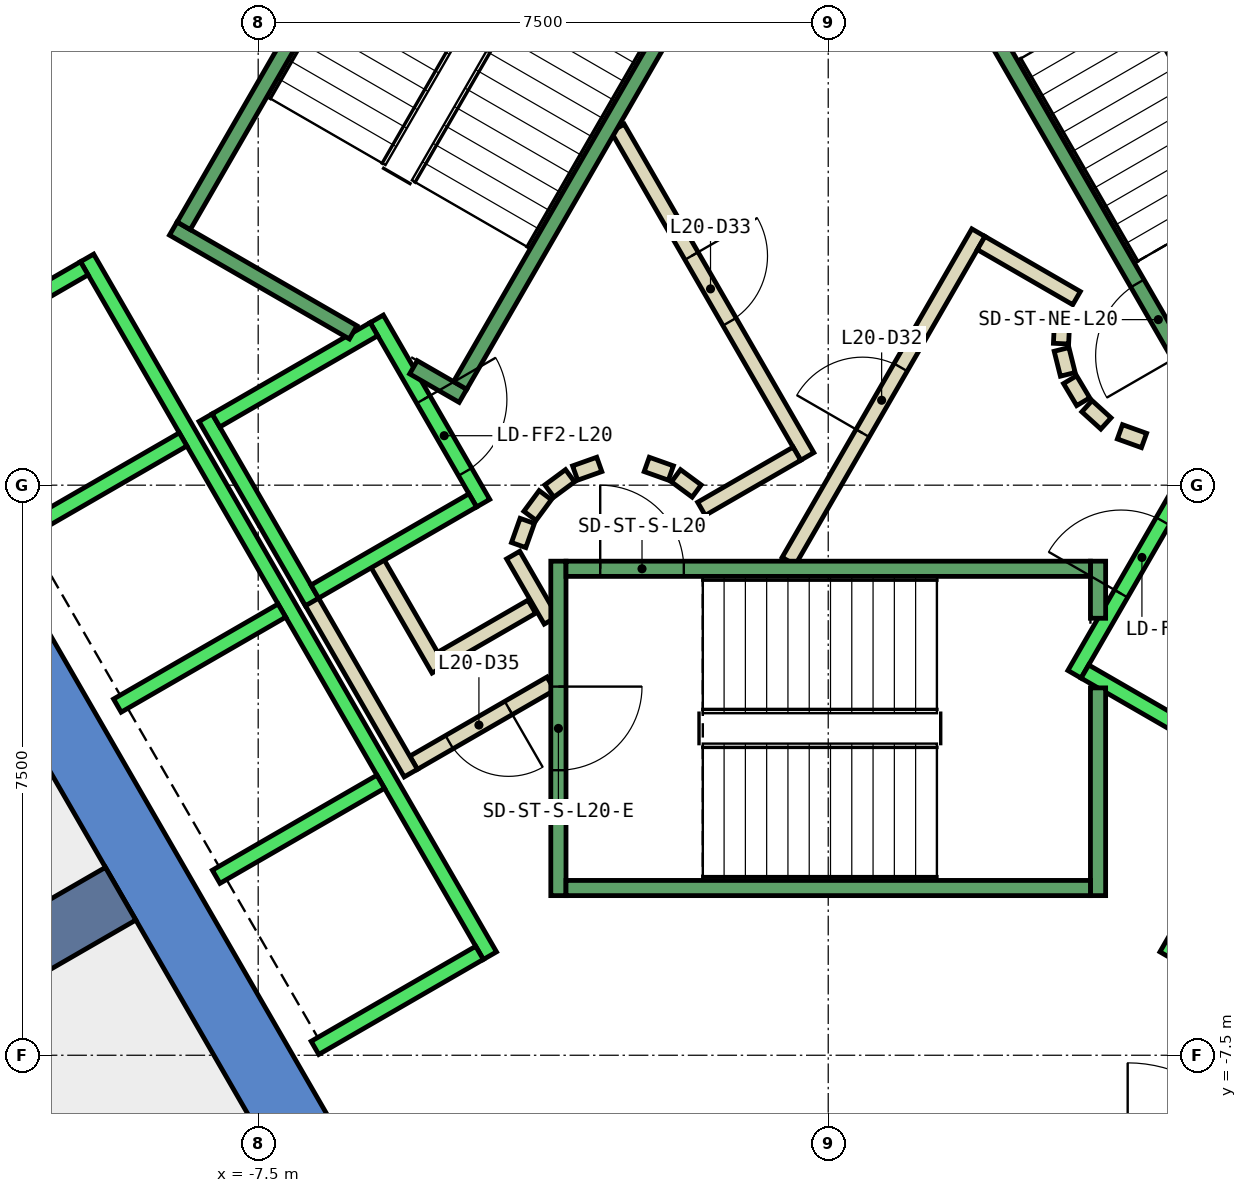
"""IFC4 building model, lengths in metres.
Left out: names, types, materials, properties, quantities, classifications, styles, units other than length and angle.
Written with IfcOpenShell. Run it as: python <this file> out.ifc"""

import sys

from ifc_helpers import new_model, si_unit, direction, frame, frame_2d, origin, place, context, subcontext, project, spatial, polyline, rectangle, outline, extrude, element, fill, save


model = new_model("IFC4")
c1 = context("Model", 3, precision=1e-05, world=origin(), true_north=direction((0.0, 1.0)))
c2 = subcontext(c1, "Body", "Model", "MODEL_VIEW")
j1 = project(units=[si_unit("LENGTHUNIT", "METRE"), si_unit("PLANEANGLEUNIT", "RADIAN")], contexts=[c1])
p1 = place(None, origin())
s1 = spatial("IfcSite", under=j1, at=p1, CompositionType="ELEMENT")
p2 = place(p1, origin())
s2 = spatial("IfcBuilding", under=s1, at=p2, CompositionType="ELEMENT")
p3 = place(p2, frame((0.0, 0.0, 95.0)))
s3 = spatial("IfcBuildingStorey", under=s2, at=p3, CompositionType="ELEMENT", Elevation=95.0)
p4 = place(p3, frame((0.0, 0.0, -0.4)))
e1 = element("IfcWall", 1, at=p4, inside=s3, PredefinedType="SHEAR", context=c2, shape_type="SweptSolid", body=[
    extrude(outline(polyline([(-12.267, 5.252), (-11.488, 4.802), (-6.409, 13.6), (-6.928, 14.5), (-12.267, 5.252)])), origin(), (0.0, 0.0, 1.0), 4.2),
])
p5 = place(p3, frame((0.0, 0.0, -0.4)))
e2 = element("IfcWall", 2, at=p5, inside=s3, PredefinedType="SHEAR", context=c2, shape_type="SweptSolid", body=[
    extrude(outline(polyline([(-13.856, 2.5), (-6.928, -9.5), (-6.409, -8.6), (-12.817, 2.5), (-13.856, 2.5)])), origin(), (0.0, 0.0, 1.0), 4.2),
])
p6 = place(p3, frame((-9.31, -5.375, -0.4), z_axis=(0.0, 0.0, 1.0), x_axis=(-0.866017533419, -0.500013631625, 0.0)))
e3 = element("IfcWall", 3, at=p6, inside=s3, PredefinedType="SHEAR", context=c2, shape_type="SweptSolid", body=[
    extrude(rectangle(XDim=9.0, YDim=0.8, at=frame_2d((4.5, 0.0))), origin(), (0.0, 0.0, 1.0), 4.2),
])
p7 = place(p3, frame((-3.9, -1.599, 0.0), z_axis=(0.0, 0.0, 1.0), x_axis=(-0.865969445389, -0.500096910261, 0.0)))
e4 = element("IfcWall", 4, at=p7, inside=s3, PredefinedType="PARTITIONING", context=c2, shape_type="SweptSolid", body=[
    extrude(rectangle(XDim=1.373, YDim=0.2, at=frame_2d((0.687, 0.0))), origin(), (0.0, 0.0, 1.0), 3.8),
])
p8 = place(p3, frame((-5.126, -2.422, 0.0), z_axis=(0.0, 0.0, 1.0), x_axis=(-0.500062241894, 0.865989465428, 0.0)))
e5 = element("IfcWall", 5, at=p8, inside=s3, PredefinedType="PARTITIONING", context=c2, shape_type="SweptSolid", body=[
    extrude(rectangle(XDim=1.7, YDim=0.2, at=frame_2d((0.85, 0.0))), origin(), (0.0, 0.0, 1.0), 3.8),
])
p9 = place(p3, frame((-3.65, -2.61, 0.0), z_axis=(0.0, 0.0, 1.0), x_axis=(-0.866072462134, -0.499918483688, 0.0)))
e6 = element("IfcWall", 6, at=p9, inside=s3, PredefinedType="PARTITIONING", context=c2, shape_type="SweptSolid", body=[
    extrude(rectangle(XDim=2.084, YDim=0.2, at=frame_2d((1.042, 0.0))), origin(), (0.0, 0.0, 1.0), 3.8),
])
p10 = place(p9, frame((0.642, 0.0, 0.0)))
e7 = element("IfcOpeningElement", 7, at=p10, cuts=e6, PredefinedType="OPENING", context=c2, shape_type="SweptSolid", body=[
    extrude(rectangle(XDim=0.9, YDim=2.1, at=frame_2d((0.45, 1.05))), frame((0.0, 0.11, 0.0), z_axis=(0.0, -1.0, 0.0), x_axis=(1.0, 0.0, 0.0)), (0.0, 0.0, 1.0), 0.22),
])
p11 = place(p3, frame((-5.492, -3.788, 0.0), z_axis=(0.0, 0.0, 1.0), x_axis=(-0.500008949224, 0.866020236886, 0.0)))
e8 = element("IfcWall", 8, at=p11, inside=s3, PredefinedType="PARTITIONING", context=c2, shape_type="SweptSolid", body=[
    extrude(rectangle(XDim=2.68, YDim=0.2, at=frame_2d((1.34, 0.0))), origin(), (0.0, 0.0, 1.0), 3.8),
])
p12 = place(p3, frame((-4.145, -0.92, 0.0), z_axis=(0.0, 0.0, 1.0), x_axis=(0.499743786207, -0.866173278362, 0.0)))
e9 = element("IfcWall", 9, at=p12, inside=s3, PredefinedType="PARTITIONING", context=c2, shape_type="SweptSolid", body=[
    extrude(rectangle(XDim=0.991, YDim=0.2, at=frame_2d((0.495, 0.0))), origin(), (0.0, 0.0, 1.0), 3.8),
])
p13 = place(p3, frame((-0.52, -1.0, 0.0), z_axis=(0.0, 0.0, 1.0), x_axis=(0.50011622646, 0.865958290007, 0.0)))
e10 = element("IfcWall", 10, at=p13, inside=s3, PredefinedType="PARTITIONING", context=c2, shape_type="SweptSolid", body=[
    extrude(rectangle(XDim=4.991, YDim=0.2, at=frame_2d((2.496, 0.0))), origin(), (0.0, 0.0, 1.0), 3.8),
])
p14 = place(p13, frame((1.945, 0.0, 0.0)))
e11 = element("IfcOpeningElement", 11, at=p14, cuts=e10, PredefinedType="OPENING", context=c2, shape_type="SweptSolid", body=[
    extrude(rectangle(XDim=1.0, YDim=2.1, at=frame_2d((0.5, 1.05))), frame((0.0, 0.11, 0.0), z_axis=(0.0, -1.0, 0.0), x_axis=(1.0, 0.0, 0.0)), (0.0, 0.0, 1.0), 0.22),
])
p15 = place(p3, frame((2.012, 3.186, 0.0), z_axis=(0.0, 0.0, 1.0), x_axis=(0.865891012941, -0.500232699559, 0.0)))
e12 = element("IfcWall", 12, at=p15, inside=s3, PredefinedType="PARTITIONING", context=c2, shape_type="SweptSolid", body=[
    extrude(rectangle(XDim=1.449, YDim=0.2, at=frame_2d((0.725, 0.0))), origin(), (0.0, 0.0, 1.0), 3.8),
])
p16 = place(p3, frame((3.079, 2.199, 0.0), z_axis=(0.0, 0.0, 1.0), x_axis=(-0.047771483479, -0.998858290933, 0.0)))
e13 = element("IfcWall", 13, at=p16, inside=s3, PredefinedType="PARTITIONING", context=c2, shape_type="SweptSolid", body=[
    extrude(rectangle(XDim=0.337, YDim=0.2, at=frame_2d((0.169, 0.0))), origin(), (0.0, 0.0, 1.0), 3.8),
])
p17 = place(p3, frame((3.07, 1.786, 0.0), z_axis=(0.0, 0.0, 1.0), x_axis=(0.242705583207, -0.970099994784, 0.0)))
e14 = element("IfcWall", 14, at=p17, inside=s3, PredefinedType="PARTITIONING", context=c2, shape_type="SweptSolid", body=[
    extrude(rectangle(XDim=0.338, YDim=0.2, at=frame_2d((0.169, 0.0))), origin(), (0.0, 0.0, 1.0), 3.8),
])
for number, where, z_axis, x_axis in (
    (15, (3.182, 1.388, 0.0), (0.0, 0.0, 1.0), (0.512, -0.859, 0.0)),
    (16, (3.404, 1.039, 0.0), (0.0, 0.0, 1.0), (0.74, -0.672, 0.0)),
):
    element("IfcWall", number, at=place(p3, frame(where, z_axis=z_axis, x_axis=x_axis)), inside=s3, PredefinedType="PARTITIONING", context=c2, shape_type="SweptSolid", body=[
        extrude(rectangle(XDim=0.338, YDim=0.2, at=frame_2d((0.169, 0.0))), origin(), (0.0, 0.0, 1.0), 3.8),
    ])
p18 = place(p3, frame((3.838, 0.702, 0.0), z_axis=(0.0, 0.0, 1.0), x_axis=(0.941035081519, -0.338308993895, 0.0)))
e17 = element("IfcWall", 17, at=p18, inside=s3, PredefinedType="PARTITIONING", context=c2, shape_type="SweptSolid", body=[
    extrude(rectangle(XDim=0.337, YDim=0.2, at=frame_2d((0.168, 0.0))), origin(), (0.0, 0.0, 1.0), 3.8),
])
p19 = place(p3, frame((-2.771, 4.7, 0.0), z_axis=(0.0, 0.0, 1.0), x_axis=(0.499969479948, -0.866043023828, 0.0)))
e18 = element("IfcWall", 18, at=p19, inside=s3, PredefinedType="PARTITIONING", context=c2, shape_type="SweptSolid", body=[
    extrude(rectangle(XDim=4.99, YDim=0.2, at=frame_2d((2.495, 0.0))), origin(), (0.0, 0.0, 1.0), 3.8),
])
p20 = place(p19, frame((1.945, 0.0, 0.0)))
e19 = element("IfcOpeningElement", 19, at=p20, cuts=e18, PredefinedType="OPENING", context=c2, shape_type="SweptSolid", body=[
    extrude(rectangle(XDim=1.0, YDim=2.1, at=frame_2d((0.5, 1.05))), frame((0.0, 0.11, 0.0), z_axis=(0.0, -1.0, 0.0), x_axis=(1.0, 0.0, 0.0)), (0.0, 0.0, 1.0), 0.22),
])
p21 = place(p3, frame((-0.412, 0.414, 0.0), z_axis=(0.0, 0.0, 1.0), x_axis=(-0.866017369001, -0.500013916395, 0.0)))
e20 = element("IfcWall", 20, at=p21, inside=s3, PredefinedType="PARTITIONING", context=c2, shape_type="SweptSolid", body=[
    extrude(rectangle(XDim=1.45, YDim=0.2, at=frame_2d((0.725, 0.0))), origin(), (0.0, 0.0, 1.0), 3.8),
])
p22 = place(p3, frame((-1.731, -0.077, 0.0), z_axis=(0.0, 0.0, 1.0), x_axis=(-0.804311165252, 0.594208338422, 0.0)))
e21 = element("IfcWall", 21, at=p22, inside=s3, PredefinedType="PARTITIONING", context=c2, shape_type="SweptSolid", body=[
    extrude(rectangle(XDim=0.338, YDim=0.2, at=frame_2d((0.169, 0.0))), origin(), (0.0, 0.0, 1.0), 3.8),
])
p23 = place(p3, frame((-2.07, 0.16, 0.0), z_axis=(0.0, 0.0, 1.0), x_axis=(-0.942199461132, 0.335052496547, 0.0)))
e22 = element("IfcWall", 22, at=p23, inside=s3, PredefinedType="PARTITIONING", context=c2, shape_type="SweptSolid", body=[
    extrude(rectangle(XDim=0.337, YDim=0.2, at=frame_2d((0.169, 0.0))), origin(), (0.0, 0.0, 1.0), 3.8),
])
p24 = place(p3, frame((-3.012, 0.273, 0.0), z_axis=(0.0, 0.0, 1.0), x_axis=(-0.942280615813, -0.334824194261, 0.0)))
e23 = element("IfcWall", 23, at=p24, inside=s3, PredefinedType="PARTITIONING", context=c2, shape_type="SweptSolid", body=[
    extrude(rectangle(XDim=0.338, YDim=0.2, at=frame_2d((0.169, 0.0))), origin(), (0.0, 0.0, 1.0), 3.8),
])
p25 = place(p3, frame((-3.397, 0.124, 0.0), z_axis=(0.0, 0.0, 1.0), x_axis=(-0.804311165252, -0.594208338422, 0.0)))
e24 = element("IfcWall", 24, at=p25, inside=s3, PredefinedType="PARTITIONING", context=c2, shape_type="SweptSolid", body=[
    extrude(rectangle(XDim=0.338, YDim=0.2, at=frame_2d((0.169, 0.0))), origin(), (0.0, 0.0, 1.0), 3.8),
])
p26 = place(p3, frame((-3.723, -0.131, 0.0), z_axis=(0.0, 0.0, 1.0), x_axis=(-0.594675113454, -0.803966112121, 0.0)))
e25 = element("IfcWall", 25, at=p26, inside=s3, PredefinedType="PARTITIONING", context=c2, shape_type="SweptSolid", body=[
    extrude(rectangle(XDim=0.338, YDim=0.2, at=frame_2d((0.169, 0.0))), origin(), (0.0, 0.0, 1.0), 3.8),
])
p27 = place(p3, frame((-3.96, -0.47, 0.0), z_axis=(0.0, 0.0, 1.0), x_axis=(-0.334824194261, -0.942280615813, 0.0)))
e26 = element("IfcWall", 26, at=p27, inside=s3, PredefinedType="PARTITIONING", context=c2, shape_type="SweptSolid", body=[
    extrude(rectangle(XDim=0.338, YDim=0.2, at=frame_2d((0.169, 0.0))), origin(), (0.0, 0.0, 1.0), 3.8),
])
p28 = place(p3, frame((-5.94, 2.188, 0.0), z_axis=(0.0, 0.0, 1.0), x_axis=(0.49994636267, -0.866056369097, 0.0)))
e27 = element("IfcWall", 27, at=p28, inside=s3, PredefinedType="STANDARD", context=c2, shape_type="SweptSolid", body=[
    extrude(rectangle(XDim=2.8, YDim=0.2, at=frame_2d((1.4, 0.0))), origin(), (0.0, 0.0, 1.0), 3.8),
])
p29 = place(p28, frame((1.225, 0.0, 0.0)))
e28 = element("IfcOpeningElement", 28, at=p29, cuts=e27, PredefinedType="OPENING", context=c2, shape_type="SweptSolid", body=[
    extrude(rectangle(XDim=1.1, YDim=2.1, at=frame_2d((0.55, 1.05))), frame((0.0, 0.11, 0.0), z_axis=(0.0, -1.0, 0.0), x_axis=(1.0, 0.0, 0.0)), (0.0, 0.0, 1.0), 0.22),
])
p30 = place(p3, frame((-8.192, 0.888, 0.0), z_axis=(0.0, 0.0, 1.0), x_axis=(0.49994636267, -0.866056369097, 0.0)))
e29 = element("IfcWall", 29, at=p30, inside=s3, PredefinedType="STANDARD", context=c2, shape_type="SweptSolid", body=[
    extrude(rectangle(XDim=2.8, YDim=0.2, at=frame_2d((1.4, 0.0))), origin(), (0.0, 0.0, 1.0), 3.8),
])
for number, where, z_axis, x_axis in (
    (30, (-5.977, 2.052, 0.0), (0.0, 0.0, 1.0), (-0.866, -0.5, 0.0)),
    (31, (-4.677, -0.2, 0.0), (0.0, 0.0, 1.0), (-0.866, -0.5, 0.0)),
):
    element("IfcWall", number, at=place(p3, frame(where, z_axis=z_axis, x_axis=x_axis)), inside=s3, PredefinedType="STANDARD", context=c2, shape_type="SweptSolid", body=[
        extrude(rectangle(XDim=2.399, YDim=0.2, at=frame_2d((1.2, 0.0))), origin(), (0.0, 0.0, 1.0), 3.8),
    ])
p31 = place(p3, frame((-9.751, 2.99, 0.0), z_axis=(0.0, 0.0, 1.0), x_axis=(0.50000090737, -0.866024879913, 0.0)))
e32 = element("IfcWall", 32, at=p31, inside=s3, PredefinedType="STANDARD", context=c2, shape_type="SweptSolid", body=[
    extrude(rectangle(XDim=10.6, YDim=0.2, at=frame_2d((5.3, 0.0))), origin(), (0.0, 0.0, 1.0), 3.8),
])
p32 = place(p3, frame((-9.788, 2.853, 0.0), z_axis=(0.0, 0.0, 1.0), x_axis=(-0.865998541277, -0.500046524342, 0.0)))
e33 = element("IfcWall", 33, at=p32, inside=s3, PredefinedType="STANDARD", context=c2, shape_type="SweptSolid", body=[
    extrude(rectangle(XDim=2.5, YDim=0.2, at=frame_2d((1.25, 0.0))), origin(), (0.0, 0.0, 1.0), 3.8),
])
for number, where, z_axis, x_axis in (
    (34, (-8.488, 0.602, 0.0), (0.0, 0.0, 1.0), (-0.866, -0.5, 0.0)),
    (35, (-7.188, -1.65, 0.0), (0.0, 0.0, 1.0), (-0.866, -0.5, 0.0)),
    (36, (-5.888, -3.902, 0.0), (0.0, 0.0, 1.0), (-0.866, -0.5, 0.0)),
    (37, (-4.588, -6.153, 0.0), (0.0, 0.0, 1.0), (-0.866, -0.5, 0.0)),
):
    element("IfcWall", number, at=place(p3, frame(where, z_axis=z_axis, x_axis=x_axis)), inside=s3, PredefinedType="STANDARD", context=c2, shape_type="SweptSolid", body=[
        extrude(rectangle(XDim=2.5, YDim=0.2, at=frame_2d((1.25, 0.0))), origin(), (0.0, 0.0, 1.0), 3.8),
    ])
p33 = place(p3, frame((3.24, -2.488, 0.0), z_axis=(0.0, 0.0, 1.0), x_axis=(0.49994636267, 0.866056369097, 0.0)))
e38 = element("IfcWall", 38, at=p33, inside=s3, PredefinedType="STANDARD", context=c2, shape_type="SweptSolid", body=[
    extrude(rectangle(XDim=2.8, YDim=0.2, at=frame_2d((1.4, 0.0))), origin(), (0.0, 0.0, 1.0), 3.8),
])
p34 = place(p33, frame((1.225, 0.0, 0.0)))
e39 = element("IfcOpeningElement", 39, at=p34, cuts=e38, PredefinedType="OPENING", context=c2, shape_type="SweptSolid", body=[
    extrude(rectangle(XDim=1.1, YDim=2.1, at=frame_2d((0.55, 1.05))), frame((0.0, 0.11, 0.0), z_axis=(0.0, -1.0, 0.0), x_axis=(1.0, 0.0, 0.0)), (0.0, 0.0, 1.0), 0.22),
])
p35 = place(p3, frame((3.377, -2.452, 0.0), z_axis=(0.0, 0.0, 1.0), x_axis=(0.865955154139, -0.50012165622, 0.0)))
e40 = element("IfcWall", 40, at=p35, inside=s3, PredefinedType="STANDARD", context=c2, shape_type="SweptSolid", body=[
    extrude(rectangle(XDim=2.4, YDim=0.2, at=frame_2d((1.2, 0.0))), origin(), (0.0, 0.0, 1.0), 3.8),
])
p36 = place(p3, frame((4.451, -6.19, 0.0), z_axis=(0.0, 0.0, 1.0), x_axis=(0.50000090737, 0.866024879913, 0.0)))
e41 = element("IfcWall", 41, at=p36, inside=s3, PredefinedType="STANDARD", context=c2, shape_type="SweptSolid", body=[
    extrude(rectangle(XDim=10.6, YDim=0.2, at=frame_2d((5.3, 0.0))), origin(), (0.0, 0.0, 1.0), 3.8),
])
p37 = place(p3, frame((-3.55, -1.0, 0.0), z_axis=(0.0, 0.0, 1.0), x_axis=(0.0, -1.0, 0.0)))
e42 = element("IfcWall", 42, at=p37, inside=s3, PredefinedType="STANDARD", context=c2, shape_type="SweptSolid", body=[
    extrude(rectangle(XDim=4.4, YDim=0.2, at=frame_2d((2.2, 0.0))), origin(), (0.0, 0.0, 1.0), 3.8),
])
p38 = place(p37, frame((1.65, 0.0, 0.0)))
e43 = element("IfcOpeningElement", 43, at=p38, cuts=e42, PredefinedType="OPENING", context=c2, shape_type="SweptSolid", body=[
    extrude(rectangle(XDim=1.1, YDim=2.2, at=frame_2d((0.55, 1.1))), frame((0.0, 0.11, 0.0), z_axis=(0.0, -1.0, 0.0), x_axis=(1.0, 0.0, 0.0)), (0.0, 0.0, 1.0), 0.22),
])
p39 = place(p3, frame((3.55, -2.667, 0.0), z_axis=(0.0, 0.0, 1.0), x_axis=(0.0, -1.0, 0.0)))
e44 = element("IfcWall", 44, at=p39, inside=s3, PredefinedType="STANDARD", context=c2, shape_type="SweptSolid", body=[
    extrude(rectangle(XDim=2.733, YDim=0.2, at=frame_2d((1.366, 0.0))), origin(), (0.0, 0.0, 1.0), 3.8),
])
p40 = place(p3, frame((3.55, -1.0, 0.0), z_axis=(0.0, 0.0, 1.0), x_axis=(0.0, -1.0, 0.0)))
e45 = element("IfcWall", 45, at=p40, inside=s3, PredefinedType="STANDARD", context=c2, shape_type="SweptSolid", body=[
    extrude(rectangle(XDim=0.751, YDim=0.2, at=frame_2d((0.375, 0.0))), origin(), (0.0, 0.0, 1.0), 3.8),
])
p41 = place(p3, frame((-3.45, -1.1, 0.0), z_axis=(0.0, 0.0, 1.0), x_axis=(1.0, 0.0, 0.0)))
e46 = element("IfcWall", 46, at=p41, inside=s3, PredefinedType="STANDARD", context=c2, shape_type="SweptSolid", body=[
    extrude(rectangle(XDim=6.9, YDim=0.2, at=frame_2d((3.45, 0.0))), origin(), (0.0, 0.0, 1.0), 3.8),
])
p42 = place(p41, frame((0.45, 0.0, 0.0)))
e47 = element("IfcOpeningElement", 47, at=p42, cuts=e46, PredefinedType="OPENING", context=c2, shape_type="SweptSolid", body=[
    extrude(rectangle(XDim=1.1, YDim=2.2, at=frame_2d((0.55, 1.1))), frame((0.0, 0.11, 0.0), z_axis=(0.0, -1.0, 0.0), x_axis=(1.0, 0.0, 0.0)), (0.0, 0.0, 1.0), 0.22),
])
p43 = place(p3, frame((-3.45, -5.3, 0.0), z_axis=(0.0, 0.0, 1.0), x_axis=(1.0, 0.0, 0.0)))
e48 = element("IfcWall", 48, at=p43, inside=s3, PredefinedType="STANDARD", context=c2, shape_type="SweptSolid", body=[
    extrude(rectangle(XDim=6.9, YDim=0.2, at=frame_2d((3.45, 0.0))), origin(), (0.0, 0.0, 1.0), 3.8),
])
p44 = place(p3, frame((4.843, 1.312, 0.0), z_axis=(0.0, 0.0, 1.0), x_axis=(-0.499963383562, 0.866046543262, 0.0)))
e49 = element("IfcWall", 49, at=p44, inside=s3, PredefinedType="STANDARD", context=c2, shape_type="SweptSolid", body=[
    extrude(rectangle(XDim=6.9, YDim=0.2, at=frame_2d((3.45, 0.0))), origin(), (0.0, 0.0, 1.0), 3.8),
])
p45 = place(p44, frame((0.45, 0.0, 0.0)))
e50 = element("IfcOpeningElement", 50, at=p45, cuts=e49, PredefinedType="OPENING", context=c2, shape_type="SweptSolid", body=[
    extrude(rectangle(XDim=1.1, YDim=2.2, at=frame_2d((0.55, 1.1))), frame((0.0, 0.11, 0.0), z_axis=(0.0, -1.0, 0.0), x_axis=(1.0, 0.0, 0.0)), (0.0, 0.0, 1.0), 0.22),
])
p46 = place(p3, frame((-6.25, 2.01, 0.0), z_axis=(0.0, 0.0, 1.0), x_axis=(-0.86611865017, 0.499838457731, 0.0)))
e51 = element("IfcWall", 51, at=p46, inside=s3, PredefinedType="STANDARD", context=c2, shape_type="SweptSolid", body=[
    extrude(rectangle(XDim=2.733, YDim=0.2, at=frame_2d((1.366, 0.0))), origin(), (0.0, 0.0, 1.0), 3.8),
])
p47 = place(p3, frame((-4.806, 1.176, 0.0), z_axis=(0.0, 0.0, 1.0), x_axis=(-0.866558586415, 0.499075361355, 0.0)))
e52 = element("IfcWall", 52, at=p47, inside=s3, PredefinedType="STANDARD", context=c2, shape_type="SweptSolid", body=[
    extrude(rectangle(XDim=0.751, YDim=0.2, at=frame_2d((0.376, 0.0))), origin(), (0.0, 0.0, 1.0), 3.8),
])
p48 = place(p3, frame((-1.393, 7.288, 0.0), z_axis=(0.0, 0.0, 1.0), x_axis=(-0.499963383562, -0.866046543262, 0.0)))
e53 = element("IfcWall", 53, at=p48, inside=s3, PredefinedType="STANDARD", context=c2, shape_type="SweptSolid", body=[
    extrude(rectangle(XDim=6.9, YDim=0.2, at=frame_2d((3.45, 0.0))), origin(), (0.0, 0.0, 1.0), 3.8),
])
p49 = place(p48, frame((0.45, 0.0, 0.0)))
e54 = element("IfcOpeningElement", 54, at=p49, cuts=e53, PredefinedType="OPENING", context=c2, shape_type="SweptSolid", body=[
    extrude(rectangle(XDim=1.1, YDim=2.2, at=frame_2d((0.55, 1.1))), frame((0.0, 0.11, 0.0), z_axis=(0.0, -1.0, 0.0), x_axis=(1.0, 0.0, 0.0)), (0.0, 0.0, 1.0), 0.22),
])
p50 = place(p3, frame((-5.03, 9.388, 0.0), z_axis=(0.0, 0.0, 1.0), x_axis=(-0.499978703459, -0.866037698999, 0.0)))
e55 = element("IfcWall", 55, at=p50, inside=s3, PredefinedType="STANDARD", context=c2, shape_type="SweptSolid", body=[
    extrude(rectangle(XDim=6.9, YDim=0.2, at=frame_2d((3.45, 0.0))), origin(), (0.0, 0.0, 1.0), 3.8),
])
p51 = place(p14, origin())
e56 = element("IfcDoor", 56, at=p51, inside=s3, OperationType="SINGLE_SWING_LEFT", PredefinedType="DOOR", context=c2, shape_type="SweptSolid", body=[
    extrude(rectangle(XDim=1.0, YDim=2.1, at=frame_2d((0.5, 1.05))), frame((0.0, 0.025, 0.0), z_axis=(0.0, -1.0, 0.0), x_axis=(1.0, 0.0, 0.0)), (0.0, 0.0, 1.0), 0.05),
])
fill(e11, e56)
p52 = place(p20, origin())
e57 = element("IfcDoor", 57, at=p52, inside=s3, OperationType="SINGLE_SWING_RIGHT", PredefinedType="DOOR", context=c2, shape_type="SweptSolid", body=[
    extrude(rectangle(XDim=1.0, YDim=2.1, at=frame_2d((0.5, 1.05))), frame((0.0, 0.025, 0.0), z_axis=(0.0, -1.0, 0.0), x_axis=(1.0, 0.0, 0.0)), (0.0, 0.0, 1.0), 0.05),
])
fill(e19, e57)
p53 = place(p10, origin())
e58 = element("IfcDoor", 58, at=p53, inside=s3, OperationType="SINGLE_SWING_LEFT", PredefinedType="DOOR", context=c2, shape_type="SweptSolid", body=[
    extrude(rectangle(XDim=0.9, YDim=2.1, at=frame_2d((0.45, 1.05))), frame((0.0, 0.025, 0.0), z_axis=(0.0, -1.0, 0.0), x_axis=(1.0, 0.0, 0.0)), (0.0, 0.0, 1.0), 0.05),
])
fill(e7, e58)
p54 = place(p34, origin())
e59 = element("IfcDoor", 59, at=p54, inside=s3, OperationType="SLIDING_TO_LEFT", PredefinedType="DOOR", context=c2, shape_type="SweptSolid", body=[
    extrude(rectangle(XDim=1.1, YDim=2.1, at=frame_2d((0.55, 1.05))), frame((0.0, 0.025, 0.0), z_axis=(0.0, -1.0, 0.0), x_axis=(1.0, 0.0, 0.0)), (0.0, 0.0, 1.0), 0.05),
])
fill(e39, e59)
p55 = place(p29, origin())
e60 = element("IfcDoor", 60, at=p55, inside=s3, OperationType="SLIDING_TO_LEFT", PredefinedType="DOOR", context=c2, shape_type="SweptSolid", body=[
    extrude(rectangle(XDim=1.1, YDim=2.1, at=frame_2d((0.55, 1.05))), frame((0.0, 0.025, 0.0), z_axis=(0.0, -1.0, 0.0), x_axis=(1.0, 0.0, 0.0)), (0.0, 0.0, 1.0), 0.05),
])
fill(e28, e60)
p56 = place(p42, origin())
e61 = element("IfcDoor", 61, at=p56, inside=s3, OperationType="SINGLE_SWING_LEFT", PredefinedType="DOOR", context=c2, shape_type="SweptSolid", body=[
    extrude(rectangle(XDim=1.1, YDim=2.2, at=frame_2d((0.55, 1.1))), frame((0.0, 0.025, 0.0), z_axis=(0.0, -1.0, 0.0), x_axis=(1.0, 0.0, 0.0)), (0.0, 0.0, 1.0), 0.05),
])
fill(e47, e61)
p57 = place(p38, origin())
e62 = element("IfcDoor", 62, at=p57, inside=s3, OperationType="SINGLE_SWING_LEFT", PredefinedType="DOOR", context=c2, shape_type="SweptSolid", body=[
    extrude(rectangle(XDim=1.1, YDim=2.2, at=frame_2d((0.55, 1.1))), frame((0.0, 0.025, 0.0), z_axis=(0.0, -1.0, 0.0), x_axis=(1.0, 0.0, 0.0)), (0.0, 0.0, 1.0), 0.05),
])
fill(e43, e62)
p58 = place(p45, origin())
e63 = element("IfcDoor", 63, at=p58, inside=s3, OperationType="SINGLE_SWING_LEFT", PredefinedType="DOOR", context=c2, shape_type="SweptSolid", body=[
    extrude(rectangle(XDim=1.1, YDim=2.2, at=frame_2d((0.55, 1.1))), frame((0.0, 0.025, 0.0), z_axis=(0.0, -1.0, 0.0), x_axis=(1.0, 0.0, 0.0)), (0.0, 0.0, 1.0), 0.05),
])
fill(e50, e63)
save(model, sys.argv[1])
